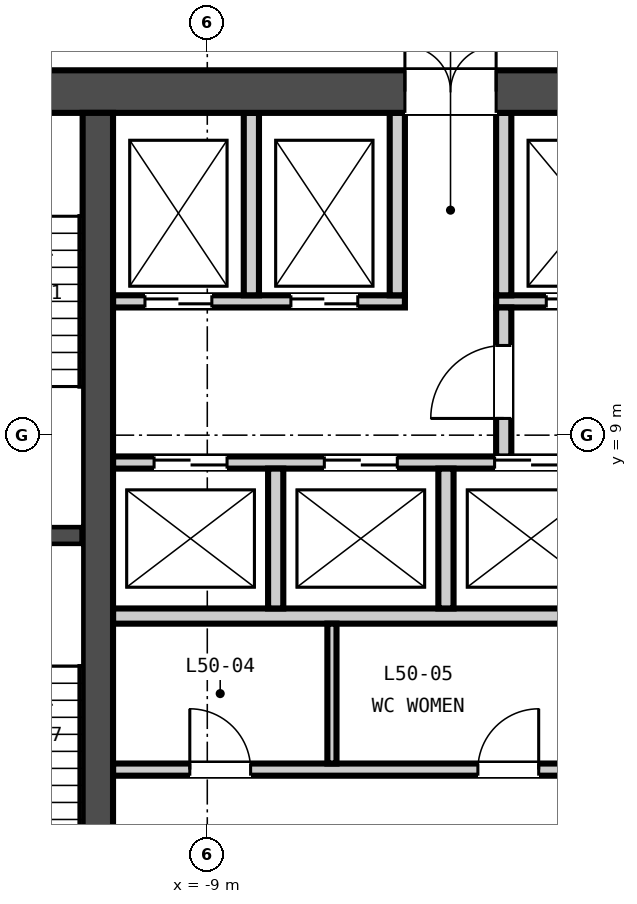
"""IFC4 building model, lengths in metres.
Left out: names, types, materials, properties, quantities, classifications, styles, units other than length and angle.
Written with IfcOpenShell. Run it as: python <this file> out.ifc"""

import sys

from ifc_helpers import new_model, si_unit, direction, frame, frame_2d, origin, place, context, subcontext, project, spatial, rectangle, extrude, element, fill, save


model = new_model("IFC4")
c1 = context("Model", 3, precision=1e-05, world=origin(), true_north=direction((0.0, 1.0)))
c2 = subcontext(c1, "Body", "Model", "MODEL_VIEW")
j1 = project(units=[si_unit("LENGTHUNIT", "METRE"), si_unit("PLANEANGLEUNIT", "RADIAN")], contexts=[c1])
p1 = place(None, origin())
s1 = spatial("IfcSite", under=j1, at=p1, CompositionType="ELEMENT")
p2 = place(p1, origin())
s2 = spatial("IfcBuilding", under=s1, at=p2, CompositionType="ELEMENT")
p3 = place(p2, frame((0.0, 0.0, 200.0)))
s3 = spatial("IfcBuildingStorey", under=s2, at=p3, CompositionType="ELEMENT", Elevation=200.0)
p4 = place(p3, frame((-15.0, 14.65, -0.15), z_axis=(0.0, 0.0, 1.0), x_axis=(1.0, 0.0, 0.0)))
e1 = element("IfcWall", 1, at=p4, inside=s3, PredefinedType="SOLIDWALL", context=c2, shape_type="SweptSolid", body=[
    extrude(rectangle(XDim=30.0, YDim=0.7, at=frame_2d((15.0, 0.0))), origin(), (0.0, 0.0, 1.0), 3.65),
])
p5 = place(p4, frame((9.25, 0.0, 0.15)))
e2 = element("IfcOpeningElement", 2, at=p5, cuts=e1, PredefinedType="OPENING", context=c2, shape_type="SweptSolid", body=[
    extrude(rectangle(XDim=1.5, YDim=2.1, at=frame_2d((0.75, 1.05))), frame((0.0, 0.36, 0.0), z_axis=(0.0, -1.0, 0.0), x_axis=(1.0, 0.0, 0.0)), (0.0, 0.0, 1.0), 0.72),
])
p6 = place(p4, frame((19.4, 0.0, 0.15)))
e3 = element("IfcOpeningElement", 3, at=p6, cuts=e1, PredefinedType="OPENING", context=c2, shape_type="SweptSolid", body=[
    extrude(rectangle(XDim=1.5, YDim=2.1, at=frame_2d((0.75, 1.05))), frame((0.0, 0.36, 0.0), z_axis=(0.0, -1.0, 0.0), x_axis=(1.0, 0.0, 0.0)), (0.0, 0.0, 1.0), 0.72),
])
p7 = place(p4, frame((1.5, 0.0, 0.15)))
e4 = element("IfcOpeningElement", 4, at=p7, cuts=e1, PredefinedType="OPENING", context=c2, shape_type="SweptSolid", body=[
    extrude(rectangle(XDim=1.2, YDim=2.1, at=frame_2d((0.6, 1.05))), frame((0.0, 0.36, 0.0), z_axis=(0.0, -1.0, 0.0), x_axis=(1.0, 0.0, 0.0)), (0.0, 0.0, 1.0), 0.72),
])
p8 = place(p4, frame((27.3, 0.0, 0.15)))
e5 = element("IfcOpeningElement", 5, at=p8, cuts=e1, PredefinedType="OPENING", context=c2, shape_type="SweptSolid", body=[
    extrude(rectangle(XDim=1.2, YDim=2.1, at=frame_2d((0.6, 1.05))), frame((0.0, 0.36, 0.0), z_axis=(0.0, -1.0, 0.0), x_axis=(1.0, 0.0, 0.0)), (0.0, 0.0, 1.0), 0.72),
])
p9 = place(p3, frame((-10.8, 0.7, -0.15), z_axis=(0.0, 0.0, 1.0), x_axis=(0.0, 1.0, 0.0)))
e6 = element("IfcWall", 6, at=p9, inside=s3, PredefinedType="SOLIDWALL", context=c2, shape_type="SweptSolid", body=[
    extrude(rectangle(XDim=13.6, YDim=0.5, at=frame_2d((6.8, 0.0))), origin(), (0.0, 0.0, 1.0), 3.65),
])
p10 = place(p3, frame((-10.55, 3.5, 0.0), z_axis=(0.0, 0.0, 1.0), x_axis=(1.0, 0.0, 0.0)))
e7 = element("IfcWall", 7, at=p10, inside=s3, PredefinedType="PARTITIONING", context=c2, shape_type="SweptSolid", body=[
    extrude(rectangle(XDim=21.1, YDim=0.2, at=frame_2d((10.55, 0.0))), origin(), (0.0, 0.0, 1.0), 3.5),
])
p11 = place(p10, frame((1.262, 0.0, 0.0)))
e8 = element("IfcOpeningElement", 8, at=p11, cuts=e7, PredefinedType="OPENING", context=c2, shape_type="SweptSolid", body=[
    extrude(rectangle(XDim=1.0, YDim=2.1, at=frame_2d((0.5, 1.05))), frame((0.0, 0.11, 0.0), z_axis=(0.0, -1.0, 0.0), x_axis=(1.0, 0.0, 0.0)), (0.0, 0.0, 1.0), 0.22),
])
p12 = place(p10, frame((6.0, 0.0, 0.0)))
e9 = element("IfcOpeningElement", 9, at=p12, cuts=e7, PredefinedType="OPENING", context=c2, shape_type="SweptSolid", body=[
    extrude(rectangle(XDim=1.0, YDim=2.1, at=frame_2d((0.5, 1.05))), frame((0.0, 0.11, 0.0), z_axis=(0.0, -1.0, 0.0), x_axis=(1.0, 0.0, 0.0)), (0.0, 0.0, 1.0), 0.22),
])
p13 = place(p10, frame((11.1, 0.0, 0.0)))
e10 = element("IfcOpeningElement", 10, at=p13, cuts=e7, PredefinedType="OPENING", context=c2, shape_type="SweptSolid", body=[
    extrude(rectangle(XDim=1.0, YDim=2.1, at=frame_2d((0.5, 1.05))), frame((0.0, 0.11, 0.0), z_axis=(0.0, -1.0, 0.0), x_axis=(1.0, 0.0, 0.0)), (0.0, 0.0, 1.0), 0.22),
])
p14 = place(p10, frame((16.113, 0.0, 0.0)))
e11 = element("IfcOpeningElement", 11, at=p14, cuts=e7, PredefinedType="OPENING", context=c2, shape_type="SweptSolid", body=[
    extrude(rectangle(XDim=1.0, YDim=2.1, at=frame_2d((0.5, 1.05))), frame((0.0, 0.11, 0.0), z_axis=(0.0, -1.0, 0.0), x_axis=(1.0, 0.0, 0.0)), (0.0, 0.0, 1.0), 0.22),
])
p15 = place(p10, frame((19.9, 0.0, 0.0)))
e12 = element("IfcOpeningElement", 12, at=p15, cuts=e7, PredefinedType="OPENING", context=c2, shape_type="SweptSolid", body=[
    extrude(rectangle(XDim=0.9, YDim=2.1, at=frame_2d((0.45, 1.05))), frame((0.0, 0.11, 0.0), z_axis=(0.0, -1.0, 0.0), x_axis=(1.0, 0.0, 0.0)), (0.0, 0.0, 1.0), 0.22),
])
p16 = place(p3, frame((-10.55, 6.025, 0.0), z_axis=(0.0, 0.0, 1.0), x_axis=(1.0, 0.0, 0.0)))
e13 = element("IfcWall", 13, at=p16, inside=s3, PredefinedType="PARTITIONING", context=c2, shape_type="SweptSolid", body=[
    extrude(rectangle(XDim=21.1, YDim=0.25, at=frame_2d((10.55, 0.0))), origin(), (0.0, 0.0, 1.0), 3.5),
])
p17 = place(p3, frame((-10.55, 8.55, 0.0), z_axis=(0.0, 0.0, 1.0), x_axis=(1.0, 0.0, 0.0)))
e14 = element("IfcWall", 14, at=p17, inside=s3, PredefinedType="PARTITIONING", context=c2, shape_type="SweptSolid", body=[
    extrude(rectangle(XDim=21.1, YDim=0.2, at=frame_2d((10.55, 0.0))), origin(), (0.0, 0.0, 1.0), 3.5),
])
p18 = place(p17, frame((0.675, 0.0, 0.0)))
e15 = element("IfcOpeningElement", 15, at=p18, cuts=e14, PredefinedType="OPENING", context=c2, shape_type="SweptSolid", body=[
    extrude(rectangle(XDim=1.2, YDim=2.1, at=frame_2d((0.6, 1.05))), frame((0.0, 0.11, 0.0), z_axis=(0.0, -1.0, 0.0), x_axis=(1.0, 0.0, 0.0)), (0.0, 0.0, 1.0), 0.22),
])
p19 = place(p17, frame((3.475, 0.0, 0.0)))
e16 = element("IfcOpeningElement", 16, at=p19, cuts=e14, PredefinedType="OPENING", context=c2, shape_type="SweptSolid", body=[
    extrude(rectangle(XDim=1.2, YDim=2.1, at=frame_2d((0.6, 1.05))), frame((0.0, 0.11, 0.0), z_axis=(0.0, -1.0, 0.0), x_axis=(1.0, 0.0, 0.0)), (0.0, 0.0, 1.0), 0.22),
])
p20 = place(p17, frame((6.275, 0.0, 0.0)))
e17 = element("IfcOpeningElement", 17, at=p20, cuts=e14, PredefinedType="OPENING", context=c2, shape_type="SweptSolid", body=[
    extrude(rectangle(XDim=1.2, YDim=2.1, at=frame_2d((0.6, 1.05))), frame((0.0, 0.11, 0.0), z_axis=(0.0, -1.0, 0.0), x_axis=(1.0, 0.0, 0.0)), (0.0, 0.0, 1.0), 0.22),
])
p21 = place(p17, frame((9.075, 0.0, 0.0)))
e18 = element("IfcOpeningElement", 18, at=p21, cuts=e14, PredefinedType="OPENING", context=c2, shape_type="SweptSolid", body=[
    extrude(rectangle(XDim=1.2, YDim=2.1, at=frame_2d((0.6, 1.05))), frame((0.0, 0.11, 0.0), z_axis=(0.0, -1.0, 0.0), x_axis=(1.0, 0.0, 0.0)), (0.0, 0.0, 1.0), 0.22),
])
p22 = place(p17, frame((11.875, 0.0, 0.0)))
e19 = element("IfcOpeningElement", 19, at=p22, cuts=e14, PredefinedType="OPENING", context=c2, shape_type="SweptSolid", body=[
    extrude(rectangle(XDim=1.2, YDim=2.1, at=frame_2d((0.6, 1.05))), frame((0.0, 0.11, 0.0), z_axis=(0.0, -1.0, 0.0), x_axis=(1.0, 0.0, 0.0)), (0.0, 0.0, 1.0), 0.22),
])
p23 = place(p17, frame((14.675, 0.0, 0.0)))
e20 = element("IfcOpeningElement", 20, at=p23, cuts=e14, PredefinedType="OPENING", context=c2, shape_type="SweptSolid", body=[
    extrude(rectangle(XDim=1.2, YDim=2.1, at=frame_2d((0.6, 1.05))), frame((0.0, 0.11, 0.0), z_axis=(0.0, -1.0, 0.0), x_axis=(1.0, 0.0, 0.0)), (0.0, 0.0, 1.0), 0.22),
])
p24 = place(p17, frame((17.475, 0.0, 0.0)))
e21 = element("IfcOpeningElement", 21, at=p24, cuts=e14, PredefinedType="OPENING", context=c2, shape_type="SweptSolid", body=[
    extrude(rectangle(XDim=1.2, YDim=2.1, at=frame_2d((0.6, 1.05))), frame((0.0, 0.11, 0.0), z_axis=(0.0, -1.0, 0.0), x_axis=(1.0, 0.0, 0.0)), (0.0, 0.0, 1.0), 0.22),
])
p25 = place(p17, frame((19.9, 0.0, 0.0)))
e22 = element("IfcOpeningElement", 22, at=p25, cuts=e14, PredefinedType="OPENING", context=c2, shape_type="SweptSolid", body=[
    extrude(rectangle(XDim=0.9, YDim=2.1, at=frame_2d((0.45, 1.05))), frame((0.0, 0.11, 0.0), z_axis=(0.0, -1.0, 0.0), x_axis=(1.0, 0.0, 0.0)), (0.0, 0.0, 1.0), 0.22),
])
p26 = place(p3, frame((-10.55, 11.2, 0.0), z_axis=(0.0, 0.0, 1.0), x_axis=(1.0, 0.0, 0.0)))
e23 = element("IfcWall", 23, at=p26, inside=s3, PredefinedType="PARTITIONING", context=c2, shape_type="SweptSolid", body=[
    extrude(rectangle(XDim=4.8, YDim=0.2, at=frame_2d((2.4, 0.0))), origin(), (0.0, 0.0, 1.0), 3.5),
])
p27 = place(p26, frame((0.525, 0.0, 0.0)))
e24 = element("IfcOpeningElement", 24, at=p27, cuts=e23, PredefinedType="OPENING", context=c2, shape_type="SweptSolid", body=[
    extrude(rectangle(XDim=1.1, YDim=2.1, at=frame_2d((0.55, 1.05))), frame((0.0, 0.11, 0.0), z_axis=(0.0, -1.0, 0.0), x_axis=(1.0, 0.0, 0.0)), (0.0, 0.0, 1.0), 0.22),
])
p28 = place(p26, frame((2.925, 0.0, 0.0)))
e25 = element("IfcOpeningElement", 25, at=p28, cuts=e23, PredefinedType="OPENING", context=c2, shape_type="SweptSolid", body=[
    extrude(rectangle(XDim=1.1, YDim=2.1, at=frame_2d((0.55, 1.05))), frame((0.0, 0.11, 0.0), z_axis=(0.0, -1.0, 0.0), x_axis=(1.0, 0.0, 0.0)), (0.0, 0.0, 1.0), 0.22),
])
p29 = place(p3, frame((-4.25, 11.2, 0.0), z_axis=(0.0, 0.0, 1.0), x_axis=(1.0, 0.0, 0.0)))
e26 = element("IfcWall", 26, at=p29, inside=s3, PredefinedType="PARTITIONING", context=c2, shape_type="SweptSolid", body=[
    extrude(rectangle(XDim=8.65, YDim=0.2, at=frame_2d((4.325, 0.0))), origin(), (0.0, 0.0, 1.0), 3.5),
])
p30 = place(p29, frame((0.825, 0.0, 0.0)))
e27 = element("IfcOpeningElement", 27, at=p30, cuts=e26, PredefinedType="OPENING", context=c2, shape_type="SweptSolid", body=[
    extrude(rectangle(XDim=1.4, YDim=2.1, at=frame_2d((0.7, 1.05))), frame((0.0, 0.11, 0.0), z_axis=(0.0, -1.0, 0.0), x_axis=(1.0, 0.0, 0.0)), (0.0, 0.0, 1.0), 0.22),
])
p31 = place(p29, frame((3.625, 0.0, 0.0)))
e28 = element("IfcOpeningElement", 28, at=p31, cuts=e26, PredefinedType="OPENING", context=c2, shape_type="SweptSolid", body=[
    extrude(rectangle(XDim=1.4, YDim=2.1, at=frame_2d((0.7, 1.05))), frame((0.0, 0.11, 0.0), z_axis=(0.0, -1.0, 0.0), x_axis=(1.0, 0.0, 0.0)), (0.0, 0.0, 1.0), 0.22),
])
p32 = place(p3, frame((-4.125, 8.65, 0.0), z_axis=(0.0, 0.0, 1.0), x_axis=(0.0, 1.0, 0.0)))
e29 = element("IfcWall", 29, at=p32, inside=s3, PredefinedType="PARTITIONING", context=c2, shape_type="SweptSolid", body=[
    extrude(rectangle(XDim=2.45, YDim=0.25, at=frame_2d((1.225, 0.0))), origin(), (0.0, 0.0, 1.0), 3.5),
])
p33 = place(p32, frame((0.625, 0.0, 0.0)))
e30 = element("IfcOpeningElement", 30, at=p33, cuts=e29, PredefinedType="OPENING", context=c2, shape_type="SweptSolid", body=[
    extrude(rectangle(XDim=1.2, YDim=2.1, at=frame_2d((0.6, 1.05))), frame((0.0, 0.135, 0.0), z_axis=(0.0, -1.0, 0.0), x_axis=(1.0, 0.0, 0.0)), (0.0, 0.0, 1.0), 0.27),
])
p34 = place(p3, frame((-6.95, 3.6, 0.0), z_axis=(0.0, 0.0, 1.0), x_axis=(0.0, 1.0, 0.0)))
e31 = element("IfcWall", 31, at=p34, inside=s3, PredefinedType="PARTITIONING", context=c2, shape_type="SweptSolid", body=[
    extrude(rectangle(XDim=2.3, YDim=0.15, at=frame_2d((1.15, 0.0))), origin(), (0.0, 0.0, 1.0), 3.5),
])
for number, where, z_axis, x_axis in (
    (32, (-7.875, 6.15, 0.0), (0.0, 0.0, 1.0), (0.0, 1.0, 0.0)),
    (33, (-5.075, 6.15, 0.0), (0.0, 0.0, 1.0), (0.0, 1.0, 0.0)),
):
    element("IfcWall", number, at=place(p3, frame(where, z_axis=z_axis, x_axis=x_axis)), inside=s3, PredefinedType="PARTITIONING", context=c2, shape_type="SweptSolid", body=[
        extrude(rectangle(XDim=2.3, YDim=0.25, at=frame_2d((1.15, 0.0))), origin(), (0.0, 0.0, 1.0), 3.5),
    ])
for number, where, z_axis, x_axis in (
    (34, (-8.275, 11.3, 0.0), (0.0, 0.0, 1.0), (0.0, 1.0, 0.0)),
    (35, (-5.875, 11.3, 0.0), (0.0, 0.0, 1.0), (0.0, 1.0, 0.0)),
    (36, (-4.125, 11.3, 0.0), (0.0, 0.0, 1.0), (0.0, 1.0, 0.0)),
):
    element("IfcWall", number, at=place(p3, frame(where, z_axis=z_axis, x_axis=x_axis)), inside=s3, PredefinedType="PARTITIONING", context=c2, shape_type="SweptSolid", body=[
        extrude(rectangle(XDim=3.0, YDim=0.25, at=frame_2d((1.5, 0.0))), origin(), (0.0, 0.0, 1.0), 3.5),
    ])
p35 = place(p3, frame((-14.0, 7.35, 0.0), z_axis=(0.0, 0.0, 1.0), x_axis=(1.0, 0.0, 0.0)))
e37 = element("IfcWall", 37, at=p35, inside=s3, PredefinedType="SOLIDWALL", context=c2, shape_type="SweptSolid", body=[
    extrude(rectangle(XDim=2.95, YDim=0.3, at=frame_2d((1.475, 0.0))), origin(), (0.0, 0.0, 1.0), 3.5),
])
p36 = place(p33, origin())
e38 = element("IfcDoor", 38, at=p36, inside=s3, OperationType="SINGLE_SWING_LEFT", PredefinedType="DOOR", context=c2, shape_type="SweptSolid", body=[
    extrude(rectangle(XDim=1.2, YDim=2.1, at=frame_2d((0.6, 1.05))), frame((0.0, 0.025, 0.0), z_axis=(0.0, -1.0, 0.0), x_axis=(1.0, 0.0, 0.0)), (0.0, 0.0, 1.0), 0.05),
])
fill(e30, e38)
p37 = place(p11, origin())
e39 = element("IfcDoor", 39, at=p37, inside=s3, OperationType="SINGLE_SWING_LEFT", PredefinedType="DOOR", context=c2, shape_type="SweptSolid", body=[
    extrude(rectangle(XDim=1.0, YDim=2.1, at=frame_2d((0.5, 1.05))), frame((0.0, 0.025, 0.0), z_axis=(0.0, -1.0, 0.0), x_axis=(1.0, 0.0, 0.0)), (0.0, 0.0, 1.0), 0.05),
])
fill(e8, e39)
p38 = place(p12, origin())
e40 = element("IfcDoor", 40, at=p38, inside=s3, OperationType="SINGLE_SWING_RIGHT", PredefinedType="DOOR", context=c2, shape_type="SweptSolid", body=[
    extrude(rectangle(XDim=1.0, YDim=2.1, at=frame_2d((0.5, 1.05))), frame((0.0, 0.025, 0.0), z_axis=(0.0, -1.0, 0.0), x_axis=(1.0, 0.0, 0.0)), (0.0, 0.0, 1.0), 0.05),
])
fill(e9, e40)
p39 = place(p18, origin())
e41 = element("IfcDoor", 41, at=p39, inside=s3, OperationType="DOUBLE_DOOR_SLIDING", PredefinedType="DOOR", context=c2, shape_type="SweptSolid", body=[
    extrude(rectangle(XDim=1.2, YDim=2.1, at=frame_2d((0.6, 1.05))), frame((0.0, 0.025, 0.0), z_axis=(0.0, -1.0, 0.0), x_axis=(1.0, 0.0, 0.0)), (0.0, 0.0, 1.0), 0.05),
])
fill(e15, e41)
p40 = place(p19, origin())
e42 = element("IfcDoor", 42, at=p40, inside=s3, OperationType="DOUBLE_DOOR_SLIDING", PredefinedType="DOOR", context=c2, shape_type="SweptSolid", body=[
    extrude(rectangle(XDim=1.2, YDim=2.1, at=frame_2d((0.6, 1.05))), frame((0.0, 0.025, 0.0), z_axis=(0.0, -1.0, 0.0), x_axis=(1.0, 0.0, 0.0)), (0.0, 0.0, 1.0), 0.05),
])
fill(e16, e42)
p41 = place(p20, origin())
e43 = element("IfcDoor", 43, at=p41, inside=s3, OperationType="DOUBLE_DOOR_SLIDING", PredefinedType="DOOR", context=c2, shape_type="SweptSolid", body=[
    extrude(rectangle(XDim=1.2, YDim=2.1, at=frame_2d((0.6, 1.05))), frame((0.0, 0.025, 0.0), z_axis=(0.0, -1.0, 0.0), x_axis=(1.0, 0.0, 0.0)), (0.0, 0.0, 1.0), 0.05),
])
fill(e17, e43)
p42 = place(p27, origin())
e44 = element("IfcDoor", 44, at=p42, inside=s3, OperationType="DOUBLE_DOOR_SLIDING", PredefinedType="DOOR", context=c2, shape_type="SweptSolid", body=[
    extrude(rectangle(XDim=1.1, YDim=2.1, at=frame_2d((0.55, 1.05))), frame((0.0, 0.025, 0.0), z_axis=(0.0, -1.0, 0.0), x_axis=(1.0, 0.0, 0.0)), (0.0, 0.0, 1.0), 0.05),
])
fill(e24, e44)
p43 = place(p28, origin())
e45 = element("IfcDoor", 45, at=p43, inside=s3, OperationType="DOUBLE_DOOR_SLIDING", PredefinedType="DOOR", context=c2, shape_type="SweptSolid", body=[
    extrude(rectangle(XDim=1.1, YDim=2.1, at=frame_2d((0.55, 1.05))), frame((0.0, 0.025, 0.0), z_axis=(0.0, -1.0, 0.0), x_axis=(1.0, 0.0, 0.0)), (0.0, 0.0, 1.0), 0.05),
])
fill(e25, e45)
p44 = place(p30, origin())
e46 = element("IfcDoor", 46, at=p44, inside=s3, OperationType="DOUBLE_DOOR_SLIDING", PredefinedType="DOOR", context=c2, shape_type="SweptSolid", body=[
    extrude(rectangle(XDim=1.4, YDim=2.1, at=frame_2d((0.7, 1.05))), frame((0.0, 0.025, 0.0), z_axis=(0.0, -1.0, 0.0), x_axis=(1.0, 0.0, 0.0)), (0.0, 0.0, 1.0), 0.05),
])
fill(e27, e46)
p45 = place(p5, origin())
e47 = element("IfcDoor", 47, at=p45, inside=s3, OperationType="DOUBLE_DOOR_SINGLE_SWING", PredefinedType="DOOR", context=c2, shape_type="SweptSolid", body=[
    extrude(rectangle(XDim=1.5, YDim=2.1, at=frame_2d((0.75, 1.05))), frame((0.0, 0.025, 0.0), z_axis=(0.0, -1.0, 0.0), x_axis=(1.0, 0.0, 0.0)), (0.0, 0.0, 1.0), 0.05),
])
fill(e2, e47)
save(model, sys.argv[1])
